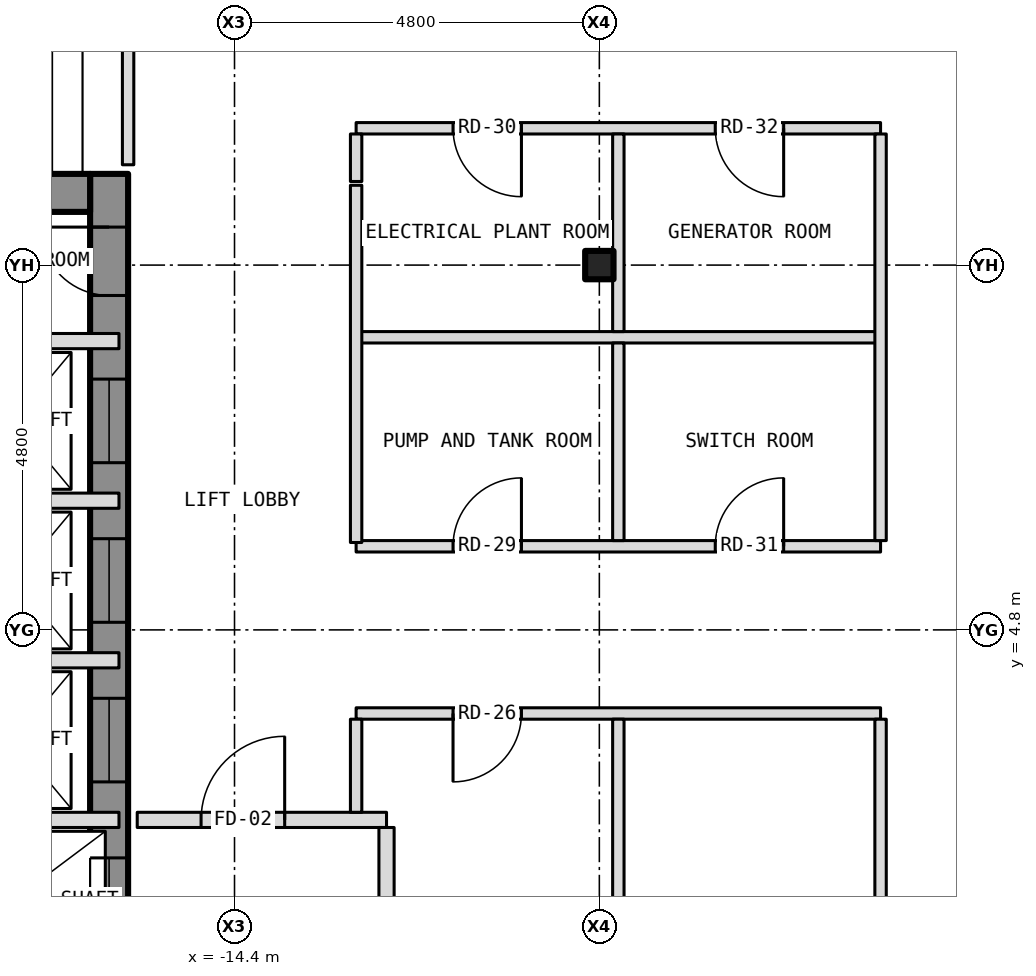
"""IFC4 building model, lengths in metres.
Left out: names, types, materials, properties, quantities, classifications, styles, units other than length and angle.
Written with IfcOpenShell. Run it as: python <this file> out.ifc"""

import sys

from ifc_helpers import new_model, si_unit, direction, frame, frame_2d, origin, origin_2d, place, context, subcontext, project, spatial, rectangle, i_section, extrude, element, fill, save


model = new_model("IFC4")
c1 = context("Model", 3, precision=1e-05, world=origin(), true_north=direction((0.0, 1.0)))
c2 = subcontext(c1, "Body", "Model", "MODEL_VIEW")
j1 = project(units=[si_unit("LENGTHUNIT", "METRE"), si_unit("PLANEANGLEUNIT", "RADIAN")], contexts=[c1])
p1 = place(None, origin())
s1 = spatial("IfcSite", under=j1, at=p1, CompositionType="ELEMENT")
p2 = place(p1, origin())
s2 = spatial("IfcBuilding", under=s1, at=p2, CompositionType="ELEMENT")
p3 = place(p2, frame((0.0, 0.0, 186.5)))
s3 = spatial("IfcBuildingStorey", under=s2, at=p3, CompositionType="ELEMENT", Elevation=186.5)
p4 = place(p3, frame((-9.6, 9.6, -0.3), z_axis=(0.0, 0.0, 1.0), x_axis=(1.0, 0.0, 0.0)))
e1 = element("IfcColumn", 1, at=p4, inside=s3, PredefinedType="COLUMN", context=c2, shape_type="SweptSolid", body=[
    extrude(i_section(OverallWidth=0.373, OverallDepth=0.373, WebThickness=0.016, FlangeThickness=0.026, at=origin_2d()), origin(), (0.0, 0.0, 1.0), 4.65),
])
p5 = place(p3, frame((-16.05, -10.8, 0.0), z_axis=(0.0, 0.0, 1.0), x_axis=(0.0, 1.0, 0.0)))
e2 = element("IfcWall", 2, at=p5, inside=s3, PredefinedType="SHEAR", context=c2, shape_type="SweptSolid", body=[
    extrude(rectangle(XDim=21.6, YDim=0.5, at=frame_2d((10.8, 0.0))), origin(), (0.0, 0.0, 1.0), 3.9),
])
p6 = place(p5, frame((9.4, 0.0, 0.0)))
e3 = element("IfcOpeningElement", 3, at=p6, cuts=e2, PredefinedType="OPENING", context=c2, shape_type="SweptSolid", body=[
    extrude(rectangle(XDim=1.1, YDim=2.1, at=frame_2d((0.55, 1.05))), frame((0.0, 0.262, 0.0), z_axis=(0.0, -1.0, 0.0), x_axis=(1.0, 0.0, 0.0)), (0.0, 0.0, 1.0), 0.524),
])
p7 = place(p5, frame((11.5, 0.0, 0.0)))
e4 = element("IfcOpeningElement", 4, at=p7, cuts=e2, PredefinedType="OPENING", context=c2, shape_type="SweptSolid", body=[
    extrude(rectangle(XDim=1.1, YDim=2.1, at=frame_2d((0.55, 1.05))), frame((0.0, 0.262, 0.0), z_axis=(0.0, -1.0, 0.0), x_axis=(1.0, 0.0, 0.0)), (0.0, 0.0, 1.0), 0.524),
])
p8 = place(p5, frame((13.6, 0.0, 0.0)))
e5 = element("IfcOpeningElement", 5, at=p8, cuts=e2, PredefinedType="OPENING", context=c2, shape_type="SweptSolid", body=[
    extrude(rectangle(XDim=1.1, YDim=2.1, at=frame_2d((0.55, 1.05))), frame((0.0, 0.262, 0.0), z_axis=(0.0, -1.0, 0.0), x_axis=(1.0, 0.0, 0.0)), (0.0, 0.0, 1.0), 0.524),
])
p9 = place(p5, frame((15.7, 0.0, 0.0)))
e6 = element("IfcOpeningElement", 6, at=p9, cuts=e2, PredefinedType="OPENING", context=c2, shape_type="SweptSolid", body=[
    extrude(rectangle(XDim=1.1, YDim=2.1, at=frame_2d((0.55, 1.05))), frame((0.0, 0.262, 0.0), z_axis=(0.0, -1.0, 0.0), x_axis=(1.0, 0.0, 0.0)), (0.0, 0.0, 1.0), 0.524),
])
p10 = place(p5, frame((17.8, 0.0, 0.0)))
e7 = element("IfcOpeningElement", 7, at=p10, cuts=e2, PredefinedType="OPENING", context=c2, shape_type="SweptSolid", body=[
    extrude(rectangle(XDim=1.1, YDim=2.1, at=frame_2d((0.55, 1.05))), frame((0.0, 0.262, 0.0), z_axis=(0.0, -1.0, 0.0), x_axis=(1.0, 0.0, 0.0)), (0.0, 0.0, 1.0), 0.524),
])
p11 = place(p5, frame((0.758, 0.0, 0.0)))
e8 = element("IfcOpeningElement", 8, at=p11, cuts=e2, PredefinedType="OPENING", context=c2, shape_type="SweptSolid", body=[
    extrude(rectangle(XDim=1.1, YDim=2.1, at=frame_2d((0.55, 1.05))), frame((0.0, 0.262, 0.0), z_axis=(0.0, -1.0, 0.0), x_axis=(1.0, 0.0, 0.0)), (0.0, 0.0, 1.0), 0.524),
])
p12 = place(p5, frame((7.5, 0.0, 0.0)))
e9 = element("IfcOpeningElement", 9, at=p12, cuts=e2, PredefinedType="OPENING", context=c2, shape_type="SweptSolid", body=[
    extrude(rectangle(XDim=1.1, YDim=2.1, at=frame_2d((0.55, 1.05))), frame((0.0, 0.262, 0.0), z_axis=(0.0, -1.0, 0.0), x_axis=(1.0, 0.0, 0.0)), (0.0, 0.0, 1.0), 0.524),
])
p13 = place(p5, frame((20.0, 0.0, 0.0)))
e10 = element("IfcOpeningElement", 10, at=p13, cuts=e2, PredefinedType="OPENING", context=c2, shape_type="SweptSolid", body=[
    extrude(rectangle(XDim=0.9, YDim=2.1, at=frame_2d((0.45, 1.05))), frame((0.0, 0.262, 0.0), z_axis=(0.0, -1.0, 0.0), x_axis=(1.0, 0.0, 0.0)), (0.0, 0.0, 1.0), 0.524),
])
p14 = place(p3, frame((-21.1, 10.55, 0.0), z_axis=(0.0, 0.0, 1.0), x_axis=(1.0, 0.0, 0.0)))
e11 = element("IfcWall", 11, at=p14, inside=s3, PredefinedType="SHEAR", context=c2, shape_type="SweptSolid", body=[
    extrude(rectangle(XDim=4.8, YDim=0.5, at=frame_2d((2.4, 0.0))), origin(), (0.0, 0.0, 1.0), 3.9),
])
p15 = place(p3, frame((-18.8, 2.3, 0.0), z_axis=(0.0, 0.0, 1.0), x_axis=(1.0, 0.0, 0.0)))
e12 = element("IfcWall", 12, at=p15, inside=s3, PredefinedType="PARTITIONING", context=c2, shape_type="SweptSolid", body=[
    extrude(rectangle(XDim=2.88, YDim=0.2, at=frame_2d((1.44, 0.0))), origin(), (0.0, 0.0, 1.0), 3.9),
])
p16 = place(p3, frame((-15.68, 2.3, 0.0), z_axis=(0.0, 0.0, 1.0), x_axis=(1.0, 0.0, 0.0)))
e13 = element("IfcWall", 13, at=p16, inside=s3, PredefinedType="PARTITIONING", context=c2, shape_type="SweptSolid", body=[
    extrude(rectangle(XDim=3.28, YDim=0.2, at=frame_2d((1.64, 0.0))), origin(), (0.0, 0.0, 1.0), 4.35),
])
p17 = place(p16, frame((0.84, 0.0, 0.0)))
e14 = element("IfcOpeningElement", 14, at=p17, cuts=e13, PredefinedType="OPENING", context=c2, shape_type="SweptSolid", body=[
    extrude(rectangle(XDim=1.1, YDim=2.1, at=frame_2d((0.55, 1.05))), frame((0.0, 0.112, 0.0), z_axis=(0.0, -1.0, 0.0), x_axis=(1.0, 0.0, 0.0)), (0.0, 0.0, 1.0), 0.224),
])
p18 = place(p3, frame((-12.8, 3.7, 0.0), z_axis=(0.0, 0.0, 1.0), x_axis=(1.0, 0.0, 0.0)))
e15 = element("IfcWall", 15, at=p18, inside=s3, PredefinedType="PARTITIONING", context=c2, shape_type="SweptSolid", body=[
    extrude(rectangle(XDim=6.9, YDim=0.15, at=frame_2d((3.45, 0.0))), origin(), (0.0, 0.0, 1.0), 4.35),
])
p19 = place(p18, frame((1.275, 0.0, 0.0)))
e16 = element("IfcOpeningElement", 16, at=p19, cuts=e15, PredefinedType="OPENING", context=c2, shape_type="SweptSolid", body=[
    extrude(rectangle(XDim=0.9, YDim=2.1, at=frame_2d((0.45, 1.05))), frame((0.0, 0.087, 0.0), z_axis=(0.0, -1.0, 0.0), x_axis=(1.0, 0.0, 0.0)), (0.0, 0.0, 1.0), 0.174),
])
p20 = place(p3, frame((-21.48, 4.4, 0.0), z_axis=(0.0, 0.0, 1.0), x_axis=(1.0, 0.0, 0.0)))
e17 = element("IfcWall", 17, at=p20, inside=s3, PredefinedType="PARTITIONING", context=c2, shape_type="SweptSolid", body=[
    extrude(rectangle(XDim=5.56, YDim=0.2, at=frame_2d((2.78, 0.0))), origin(), (0.0, 0.0, 1.0), 3.9),
])
p21 = place(p20, frame((0.83, 0.0, 0.0)))
e18 = element("IfcOpeningElement", 18, at=p21, cuts=e17, PredefinedType="OPENING", context=c2, shape_type="SweptSolid", body=[
    extrude(rectangle(XDim=0.9, YDim=2.1, at=frame_2d((0.45, 1.05))), frame((0.0, 0.112, 0.0), z_axis=(0.0, -1.0, 0.0), x_axis=(1.0, 0.0, 0.0)), (0.0, 0.0, 1.0), 0.224),
])
p22 = place(p3, frame((-12.8, 5.9, 0.0), z_axis=(0.0, 0.0, 1.0), x_axis=(1.0, 0.0, 0.0)))
e19 = element("IfcWall", 19, at=p22, inside=s3, PredefinedType="PARTITIONING", context=c2, shape_type="SweptSolid", body=[
    extrude(rectangle(XDim=6.9, YDim=0.15, at=frame_2d((3.45, 0.0))), origin(), (0.0, 0.0, 1.0), 4.35),
])
p23 = place(p22, frame((1.275, 0.0, 0.0)))
e20 = element("IfcOpeningElement", 20, at=p23, cuts=e19, PredefinedType="OPENING", context=c2, shape_type="SweptSolid", body=[
    extrude(rectangle(XDim=0.9, YDim=2.1, at=frame_2d((0.45, 1.05))), frame((0.0, 0.087, 0.0), z_axis=(0.0, -1.0, 0.0), x_axis=(1.0, 0.0, 0.0)), (0.0, 0.0, 1.0), 0.174),
])
p24 = place(p22, frame((4.725, 0.0, 0.0)))
e21 = element("IfcOpeningElement", 21, at=p24, cuts=e19, PredefinedType="OPENING", context=c2, shape_type="SweptSolid", body=[
    extrude(rectangle(XDim=0.9, YDim=2.1, at=frame_2d((0.45, 1.05))), frame((0.0, 0.087, 0.0), z_axis=(0.0, -1.0, 0.0), x_axis=(1.0, 0.0, 0.0)), (0.0, 0.0, 1.0), 0.174),
])
for number, where, z_axis, x_axis in (
    (22, (-18.8, 6.5, 0.0), (0.0, 0.0, 1.0), (1.0, 0.0, 0.0)),
    (23, (-18.8, 8.6, 0.0), (0.0, 0.0, 1.0), (1.0, 0.0, 0.0)),
):
    element("IfcWall", number, at=place(p3, frame(where, z_axis=z_axis, x_axis=x_axis)), inside=s3, PredefinedType="PARTITIONING", context=c2, shape_type="SweptSolid", body=[
        extrude(rectangle(XDim=2.88, YDim=0.2, at=frame_2d((1.44, 0.0))), origin(), (0.0, 0.0, 1.0), 3.9),
    ])
p25 = place(p3, frame((-12.8, 8.65, 0.0), z_axis=(0.0, 0.0, 1.0), x_axis=(1.0, 0.0, 0.0)))
e24 = element("IfcWall", 24, at=p25, inside=s3, PredefinedType="PARTITIONING", context=c2, shape_type="SweptSolid", body=[
    extrude(rectangle(XDim=6.9, YDim=0.15, at=frame_2d((3.45, 0.0))), origin(), (0.0, 0.0, 1.0), 4.35),
])
p26 = place(p3, frame((-12.8, 11.4, 0.0), z_axis=(0.0, 0.0, 1.0), x_axis=(1.0, 0.0, 0.0)))
e25 = element("IfcWall", 25, at=p26, inside=s3, PredefinedType="PARTITIONING", context=c2, shape_type="SweptSolid", body=[
    extrude(rectangle(XDim=6.9, YDim=0.15, at=frame_2d((3.45, 0.0))), origin(), (0.0, 0.0, 1.0), 4.35),
])
p27 = place(p26, frame((1.275, 0.0, 0.0)))
e26 = element("IfcOpeningElement", 26, at=p27, cuts=e25, PredefinedType="OPENING", context=c2, shape_type="SweptSolid", body=[
    extrude(rectangle(XDim=0.9, YDim=2.1, at=frame_2d((0.45, 1.05))), frame((0.0, 0.087, 0.0), z_axis=(0.0, -1.0, 0.0), x_axis=(1.0, 0.0, 0.0)), (0.0, 0.0, 1.0), 0.174),
])
p28 = place(p26, frame((4.725, 0.0, 0.0)))
e27 = element("IfcOpeningElement", 27, at=p28, cuts=e25, PredefinedType="OPENING", context=c2, shape_type="SweptSolid", body=[
    extrude(rectangle(XDim=0.9, YDim=2.1, at=frame_2d((0.45, 1.05))), frame((0.0, 0.087, 0.0), z_axis=(0.0, -1.0, 0.0), x_axis=(1.0, 0.0, 0.0)), (0.0, 0.0, 1.0), 0.174),
])
p29 = place(p3, frame((-15.8, 10.92, 0.0), z_axis=(0.0, 0.0, 1.0), x_axis=(0.0, 1.0, 0.0)))
e28 = element("IfcWall", 28, at=p29, inside=s3, PredefinedType="PARTITIONING", context=c2, shape_type="SweptSolid", body=[
    extrude(rectangle(XDim=2.605, YDim=0.15, at=frame_2d((1.302, 0.0))), origin(), (0.0, 0.0, 1.0), 4.35),
])
p30 = place(p3, frame((-12.8, 2.4, 0.0), z_axis=(0.0, 0.0, 1.0), x_axis=(0.0, 1.0, 0.0)))
e29 = element("IfcWall", 29, at=p30, inside=s3, PredefinedType="PARTITIONING", context=c2, shape_type="SweptSolid", body=[
    extrude(rectangle(XDim=1.225, YDim=0.15, at=frame_2d((0.613, 0.0))), origin(), (0.0, 0.0, 1.0), 4.35),
])
p31 = place(p3, frame((-12.8, 5.95, 0.0), z_axis=(0.0, 0.0, 1.0), x_axis=(0.0, 1.0, 0.0)))
e30 = element("IfcWall", 30, at=p31, inside=s3, PredefinedType="PARTITIONING", context=c2, shape_type="SweptSolid", body=[
    extrude(rectangle(XDim=4.7, YDim=0.15, at=frame_2d((2.35, 0.0))), origin(), (0.0, 0.0, 1.0), 4.35),
])
p32 = place(p3, frame((-12.8, 10.7, 0.0), z_axis=(0.0, 0.0, 1.0), x_axis=(0.0, 1.0, 0.0)))
e31 = element("IfcWall", 31, at=p32, inside=s3, PredefinedType="PARTITIONING", context=c2, shape_type="SweptSolid", body=[
    extrude(rectangle(XDim=0.625, YDim=0.15, at=frame_2d((0.312, 0.0))), origin(), (0.0, 0.0, 1.0), 4.35),
])
p33 = place(p3, frame((-12.4, -1.8, 0.0), z_axis=(0.0, 0.0, 1.0), x_axis=(0.0, 1.0, 0.0)))
e32 = element("IfcWall", 32, at=p33, inside=s3, PredefinedType="PARTITIONING", context=c2, shape_type="SweptSolid", body=[
    extrude(rectangle(XDim=4.0, YDim=0.2, at=frame_2d((2.0, 0.0))), origin(), (0.0, 0.0, 1.0), 4.35),
])
p34 = place(p3, frame((-9.35, -3.775, 0.0), z_axis=(0.0, 0.0, 1.0), x_axis=(0.0, 1.0, 0.0)))
e33 = element("IfcWall", 33, at=p34, inside=s3, PredefinedType="PARTITIONING", context=c2, shape_type="SweptSolid", body=[
    extrude(rectangle(XDim=7.4, YDim=0.15, at=frame_2d((3.7, 0.0))), origin(), (0.0, 0.0, 1.0), 4.35),
])
for number, where, z_axis, x_axis in (
    (34, (-9.35, 5.975, 0.0), (0.0, 0.0, 1.0), (0.0, 1.0, 0.0)),
    (35, (-9.35, 8.725, 0.0), (0.0, 0.0, 1.0), (0.0, 1.0, 0.0)),
):
    element("IfcWall", number, at=place(p3, frame(where, z_axis=z_axis, x_axis=x_axis)), inside=s3, PredefinedType="PARTITIONING", context=c2, shape_type="SweptSolid", body=[
        extrude(rectangle(XDim=2.6, YDim=0.15, at=frame_2d((1.3, 0.0))), origin(), (0.0, 0.0, 1.0), 4.35),
    ])
p35 = place(p3, frame((-5.9, -11.325, 0.0), z_axis=(0.0, 0.0, 1.0), x_axis=(0.0, 1.0, 0.0)))
e36 = element("IfcWall", 36, at=p35, inside=s3, PredefinedType="PARTITIONING", context=c2, shape_type="SweptSolid", body=[
    extrude(rectangle(XDim=14.95, YDim=0.15, at=frame_2d((7.475, 0.0))), origin(), (0.0, 0.0, 1.0), 4.35),
])
p36 = place(p35, frame((3.25, 0.0, 0.0)))
e37 = element("IfcOpeningElement", 37, at=p36, cuts=e36, PredefinedType="OPENING", context=c2, shape_type="SweptSolid", body=[
    extrude(rectangle(XDim=0.9, YDim=2.1, at=frame_2d((0.45, 1.05))), frame((0.0, 0.087, 0.0), z_axis=(0.0, -1.0, 0.0), x_axis=(1.0, 0.0, 0.0)), (0.0, 0.0, 1.0), 0.174),
])
p37 = place(p35, frame((10.8, 0.0, 0.0)))
e38 = element("IfcOpeningElement", 38, at=p37, cuts=e36, PredefinedType="OPENING", context=c2, shape_type="SweptSolid", body=[
    extrude(rectangle(XDim=0.9, YDim=2.1, at=frame_2d((0.45, 1.05))), frame((0.0, 0.087, 0.0), z_axis=(0.0, -1.0, 0.0), x_axis=(1.0, 0.0, 0.0)), (0.0, 0.0, 1.0), 0.174),
])
p38 = place(p3, frame((-5.9, 5.975, 0.0), z_axis=(0.0, 0.0, 1.0), x_axis=(0.0, 1.0, 0.0)))
e39 = element("IfcWall", 39, at=p38, inside=s3, PredefinedType="PARTITIONING", context=c2, shape_type="SweptSolid", body=[
    extrude(rectangle(XDim=5.35, YDim=0.15, at=frame_2d((2.675, 0.0))), origin(), (0.0, 0.0, 1.0), 4.35),
])
p39 = place(p7, origin())
e40 = element("IfcDoor", 40, at=p39, inside=s3, OperationType="SLIDING_TO_LEFT", PredefinedType="DOOR", context=c2, shape_type="SweptSolid", body=[
    extrude(rectangle(XDim=1.1, YDim=2.1, at=frame_2d((0.55, 1.05))), frame((0.0, 0.025, 0.0), z_axis=(0.0, -1.0, 0.0), x_axis=(1.0, 0.0, 0.0)), (0.0, 0.0, 1.0), 0.05),
])
fill(e4, e40)
p40 = place(p8, origin())
e41 = element("IfcDoor", 41, at=p40, inside=s3, OperationType="SLIDING_TO_LEFT", PredefinedType="DOOR", context=c2, shape_type="SweptSolid", body=[
    extrude(rectangle(XDim=1.1, YDim=2.1, at=frame_2d((0.55, 1.05))), frame((0.0, 0.025, 0.0), z_axis=(0.0, -1.0, 0.0), x_axis=(1.0, 0.0, 0.0)), (0.0, 0.0, 1.0), 0.05),
])
fill(e5, e41)
p41 = place(p9, origin())
e42 = element("IfcDoor", 42, at=p41, inside=s3, OperationType="SLIDING_TO_LEFT", PredefinedType="DOOR", context=c2, shape_type="SweptSolid", body=[
    extrude(rectangle(XDim=1.1, YDim=2.1, at=frame_2d((0.55, 1.05))), frame((0.0, 0.025, 0.0), z_axis=(0.0, -1.0, 0.0), x_axis=(1.0, 0.0, 0.0)), (0.0, 0.0, 1.0), 0.05),
])
fill(e6, e42)
p42 = place(p10, origin())
e43 = element("IfcDoor", 43, at=p42, inside=s3, OperationType="SLIDING_TO_LEFT", PredefinedType="DOOR", context=c2, shape_type="SweptSolid", body=[
    extrude(rectangle(XDim=1.1, YDim=2.1, at=frame_2d((0.55, 1.05))), frame((0.0, 0.025, 0.0), z_axis=(0.0, -1.0, 0.0), x_axis=(1.0, 0.0, 0.0)), (0.0, 0.0, 1.0), 0.05),
])
fill(e7, e43)
p43 = place(p13, origin())
e44 = element("IfcDoor", 44, at=p43, inside=s3, OperationType="SINGLE_SWING_RIGHT", PredefinedType="DOOR", context=c2, shape_type="SweptSolid", body=[
    extrude(rectangle(XDim=0.9, YDim=2.1, at=frame_2d((0.45, 1.05))), frame((0.0, 0.025, 0.0), z_axis=(0.0, -1.0, 0.0), x_axis=(1.0, 0.0, 0.0)), (0.0, 0.0, 1.0), 0.05),
])
fill(e10, e44)
p44 = place(p17, origin())
e45 = element("IfcDoor", 45, at=p44, inside=s3, OperationType="SINGLE_SWING_RIGHT", PredefinedType="DOOR", context=c2, shape_type="SweptSolid", body=[
    extrude(rectangle(XDim=1.1, YDim=2.1, at=frame_2d((0.55, 1.05))), frame((0.0, 0.025, 0.0), z_axis=(0.0, -1.0, 0.0), x_axis=(1.0, 0.0, 0.0)), (0.0, 0.0, 1.0), 0.05),
])
fill(e14, e45)
p45 = place(p19, origin())
e46 = element("IfcDoor", 46, at=p45, inside=s3, OperationType="SINGLE_SWING_LEFT", PredefinedType="DOOR", context=c2, shape_type="SweptSolid", body=[
    extrude(rectangle(XDim=0.9, YDim=2.1, at=frame_2d((0.45, 1.05))), frame((0.0, 0.025, 0.0), z_axis=(0.0, -1.0, 0.0), x_axis=(1.0, 0.0, 0.0)), (0.0, 0.0, 1.0), 0.05),
])
fill(e16, e46)
p46 = place(p23, origin())
e47 = element("IfcDoor", 47, at=p46, inside=s3, OperationType="SINGLE_SWING_RIGHT", PredefinedType="DOOR", context=c2, shape_type="SweptSolid", body=[
    extrude(rectangle(XDim=0.9, YDim=2.1, at=frame_2d((0.45, 1.05))), frame((0.0, 0.025, 0.0), z_axis=(0.0, -1.0, 0.0), x_axis=(1.0, 0.0, 0.0)), (0.0, 0.0, 1.0), 0.05),
])
fill(e20, e47)
p47 = place(p27, origin())
e48 = element("IfcDoor", 48, at=p47, inside=s3, OperationType="SINGLE_SWING_RIGHT", PredefinedType="DOOR", context=c2, shape_type="SweptSolid", body=[
    extrude(rectangle(XDim=0.9, YDim=2.1, at=frame_2d((0.45, 1.05))), frame((0.0, 0.025, 0.0), z_axis=(0.0, -1.0, 0.0), x_axis=(1.0, 0.0, 0.0)), (0.0, 0.0, 1.0), 0.05),
])
fill(e26, e48)
p48 = place(p24, origin())
e49 = element("IfcDoor", 49, at=p48, inside=s3, OperationType="SINGLE_SWING_RIGHT", PredefinedType="DOOR", context=c2, shape_type="SweptSolid", body=[
    extrude(rectangle(XDim=0.9, YDim=2.1, at=frame_2d((0.45, 1.05))), frame((0.0, 0.025, 0.0), z_axis=(0.0, -1.0, 0.0), x_axis=(1.0, 0.0, 0.0)), (0.0, 0.0, 1.0), 0.05),
])
fill(e21, e49)
p49 = place(p28, origin())
e50 = element("IfcDoor", 50, at=p49, inside=s3, OperationType="SINGLE_SWING_RIGHT", PredefinedType="DOOR", context=c2, shape_type="SweptSolid", body=[
    extrude(rectangle(XDim=0.9, YDim=2.1, at=frame_2d((0.45, 1.05))), frame((0.0, 0.025, 0.0), z_axis=(0.0, -1.0, 0.0), x_axis=(1.0, 0.0, 0.0)), (0.0, 0.0, 1.0), 0.05),
])
fill(e27, e50)
save(model, sys.argv[1])
